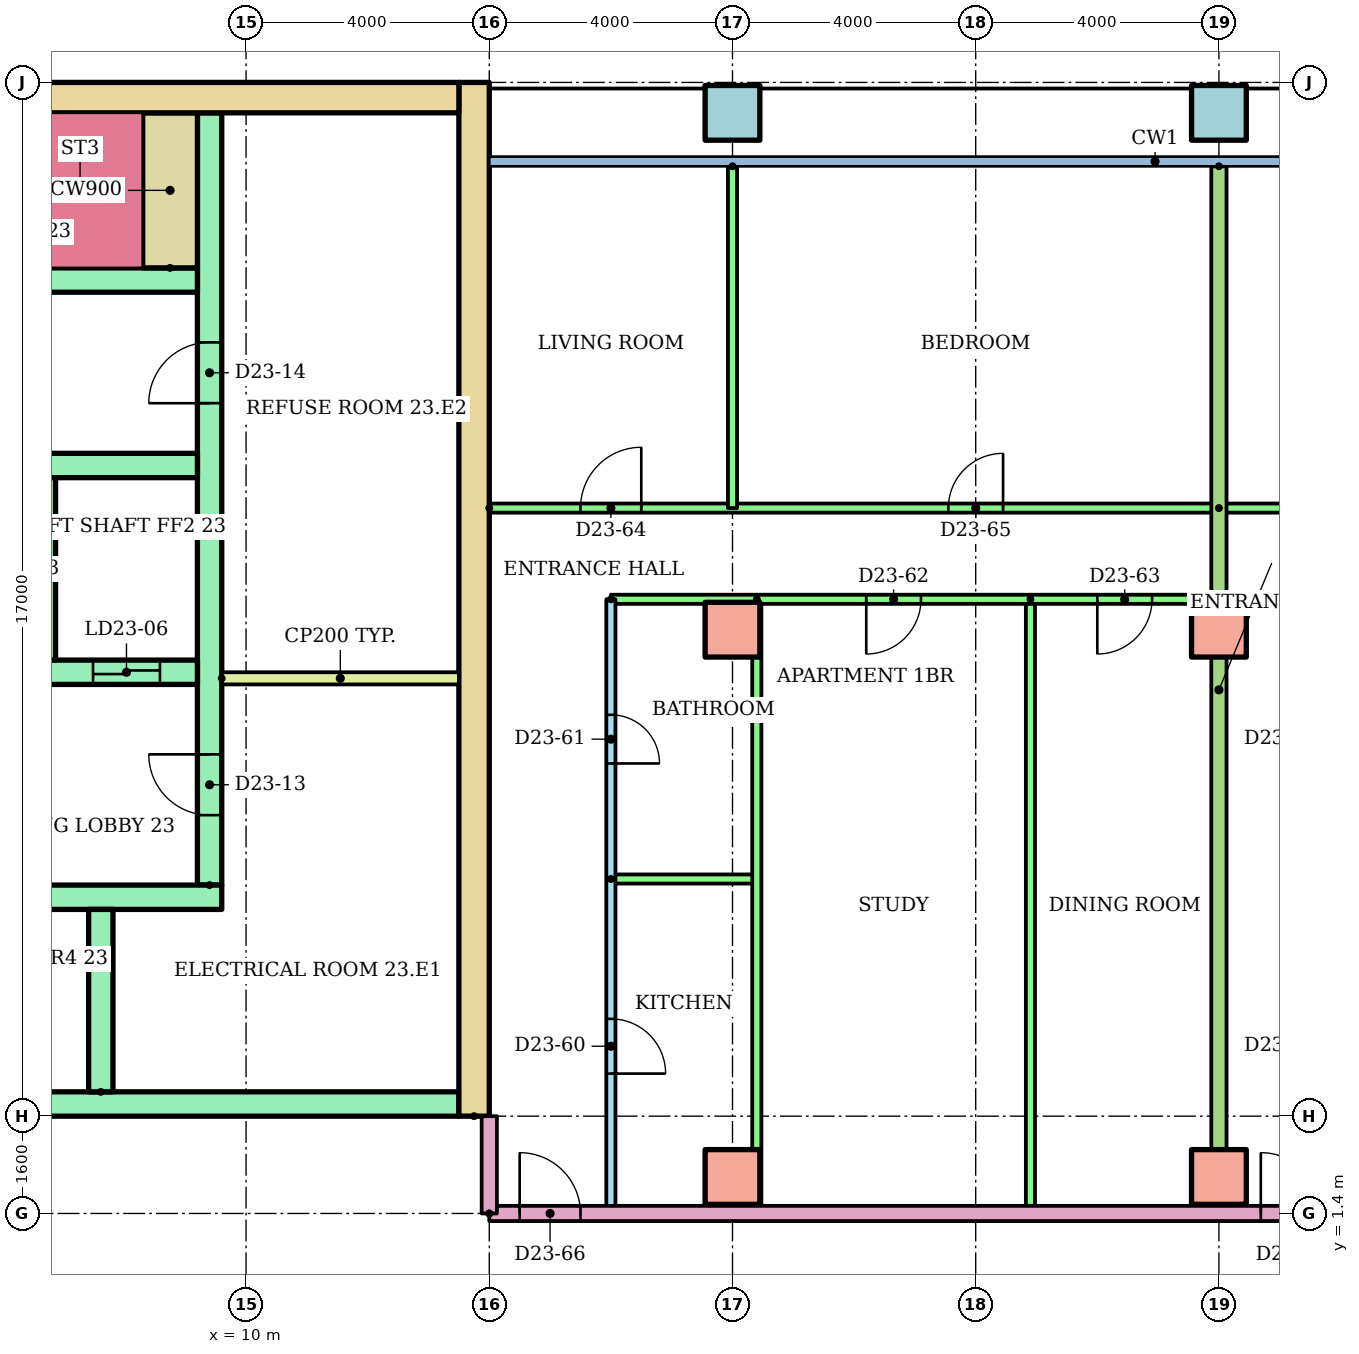
"""IFC4 building model, lengths in metres.
Left out: names, types, materials, properties, quantities, classifications, styles, units other than length and angle.
Written with IfcOpenShell. Run it as: python <this file> out.ifc"""

import sys

from ifc_helpers import new_model, si_unit, direction, frame, frame_2d, origin, origin_2d, place, context, subcontext, project, spatial, rectangle, hollow_rectangle, extrude, element, fill, save


model = new_model("IFC4")
c1 = context("Model", 3, precision=1e-05, world=origin(), true_north=direction((0.0, 1.0)))
c2 = subcontext(c1, "Body", "Model", "MODEL_VIEW")
j1 = project(units=[si_unit("LENGTHUNIT", "METRE"), si_unit("PLANEANGLEUNIT", "RADIAN")], contexts=[c1])
p1 = place(None, origin())
s1 = spatial("IfcSite", under=j1, at=p1, CompositionType="ELEMENT")
p2 = place(p1, origin())
s2 = spatial("IfcBuilding", under=s1, at=p2, CompositionType="ELEMENT")
p3 = place(p2, frame((0.0, 0.0, 90.3)))
s3 = spatial("IfcBuildingStorey", under=s2, at=p3, CompositionType="ELEMENT", Elevation=90.3)
for number, where in (
    (1, (18.0, 2.0, 0.0)),
    (2, (26.0, 2.0, 0.0)),
    (3, (18.0, 11.0, 0.0)),
    (4, (26.0, 11.0, 0.0)),
):
    element("IfcColumn", number, at=place(p3, frame(where)), inside=s3, PredefinedType="COLUMN", context=c2, shape_type="SweptSolid", body=[
        extrude(rectangle(XDim=0.9, YDim=0.9, at=origin_2d()), origin(), (0.0, 0.0, 1.0), 3.2),
    ])
for number, where in (
    (5, (18.0, 19.5, 0.0)),
    (6, (26.0, 19.5, 0.0)),
):
    element("IfcColumn", number, at=place(p3, frame(where)), inside=s3, PredefinedType="COLUMN", context=c2, shape_type="SweptSolid", body=[
        extrude(hollow_rectangle(XDim=0.9, YDim=0.9, WallThickness=0.045, at=origin_2d()), origin(), (0.0, 0.0, 1.0), 3.2),
    ])
p4 = place(p3, frame((13.75, 3.0, 0.0), z_axis=(0.0, 0.0, 1.0), x_axis=(0.0, 1.0, 0.0)))
e7 = element("IfcWall", 7, at=p4, inside=s3, PredefinedType="SHEAR", context=c2, shape_type="SweptSolid", body=[
    extrude(rectangle(XDim=17.0, YDim=0.5, at=frame_2d((8.5, 0.0))), origin(), (0.0, 0.0, 1.0), 2.92),
])
p5 = place(p3, frame((-13.5, 19.75, 0.0)))
e8 = element("IfcWall", 8, at=p5, inside=s3, PredefinedType="SHEAR", context=c2, shape_type="SweptSolid", body=[
    extrude(rectangle(XDim=27.0, YDim=0.5, at=frame_2d((13.5, 0.0))), origin(), (0.0, 0.0, 1.0), 2.92),
])
p6 = place(p3, frame((9.4, 6.8, 0.0), z_axis=(0.0, 0.0, 1.0), x_axis=(0.0, 1.0, 0.0)))
e9 = element("IfcWall", 9, at=p6, inside=s3, PredefinedType="SHEAR", context=c2, shape_type="SweptSolid", body=[
    extrude(rectangle(XDim=12.7, YDim=0.4, at=frame_2d((6.35, 0.0))), origin(), (0.0, 0.0, 1.0), 2.92),
])
p7 = place(p6, frame((1.15, 0.0, 0.0)))
e10 = element("IfcOpeningElement", 10, at=p7, cuts=e9, PredefinedType="OPENING", context=c2, shape_type="SweptSolid", body=[
    extrude(rectangle(XDim=1.0, YDim=2.1, at=frame_2d((0.5, 1.05))), frame((0.0, 0.21, 0.0), z_axis=(0.0, -1.0, 0.0), x_axis=(1.0, 0.0, 0.0)), (0.0, 0.0, 1.0), 0.42),
])
p8 = place(p6, frame((7.925, 0.0, 0.0)))
e11 = element("IfcOpeningElement", 11, at=p8, cuts=e9, PredefinedType="OPENING", context=c2, shape_type="SweptSolid", body=[
    extrude(rectangle(XDim=1.0, YDim=2.1, at=frame_2d((0.5, 1.05))), frame((0.0, 0.21, 0.0), z_axis=(0.0, -1.0, 0.0), x_axis=(1.0, 0.0, 0.0)), (0.0, 0.0, 1.0), 0.42),
])
p9 = place(p3, frame((-13.5, 3.2, 0.0)))
e12 = element("IfcWall", 12, at=p9, inside=s3, PredefinedType="SHEAR", context=c2, shape_type="SweptSolid", body=[
    extrude(rectangle(XDim=27.0, YDim=0.4, at=frame_2d((13.5, 0.0))), origin(), (0.0, 0.0, 1.0), 2.92),
])
p10 = place(p9, frame((6.861, 0.0, 0.0)))
e13 = element("IfcOpeningElement", 13, at=p10, cuts=e12, PredefinedType="OPENING", context=c2, shape_type="SweptSolid", body=[
    extrude(rectangle(XDim=1.1, YDim=2.1, at=frame_2d((0.55, 1.05))), frame((0.0, 0.21, 0.0), z_axis=(0.0, -1.0, 0.0), x_axis=(1.0, 0.0, 0.0)), (0.0, 0.0, 1.0), 0.42),
])
p11 = place(p9, frame((9.906, 0.0, 0.0)))
e14 = element("IfcOpeningElement", 14, at=p11, cuts=e12, PredefinedType="OPENING", context=c2, shape_type="SweptSolid", body=[
    extrude(rectangle(XDim=1.1, YDim=2.1, at=frame_2d((0.55, 1.05))), frame((0.0, 0.21, 0.0), z_axis=(0.0, -1.0, 0.0), x_axis=(1.0, 0.0, 0.0)), (0.0, 0.0, 1.0), 0.42),
])
p12 = place(p9, frame((15.994, 0.0, 0.0)))
e15 = element("IfcOpeningElement", 15, at=p12, cuts=e12, PredefinedType="OPENING", context=c2, shape_type="SweptSolid", body=[
    extrude(rectangle(XDim=1.1, YDim=2.1, at=frame_2d((0.55, 1.05))), frame((0.0, 0.21, 0.0), z_axis=(0.0, -1.0, 0.0), x_axis=(1.0, 0.0, 0.0)), (0.0, 0.0, 1.0), 0.42),
])
p13 = place(p9, frame((19.039, 0.0, 0.0)))
e16 = element("IfcOpeningElement", 16, at=p13, cuts=e12, PredefinedType="OPENING", context=c2, shape_type="SweptSolid", body=[
    extrude(rectangle(XDim=1.1, YDim=2.1, at=frame_2d((0.55, 1.05))), frame((0.0, 0.21, 0.0), z_axis=(0.0, -1.0, 0.0), x_axis=(1.0, 0.0, 0.0)), (0.0, 0.0, 1.0), 0.42),
])
p14 = place(p9, frame((12.6, 0.0, 0.0)))
e17 = element("IfcOpeningElement", 17, at=p14, cuts=e12, PredefinedType="OPENING", context=c2, shape_type="SweptSolid", body=[
    extrude(rectangle(XDim=1.8, YDim=2.1, at=frame_2d((0.9, 1.05))), frame((0.0, 0.21, 0.0), z_axis=(0.0, -1.0, 0.0), x_axis=(1.0, 0.0, 0.0)), (0.0, 0.0, 1.0), 0.42),
])
p15 = place(p3, frame((1.522, 6.6, 0.0)))
e18 = element("IfcWall", 18, at=p15, inside=s3, PredefinedType="SHEAR", context=c2, shape_type="SweptSolid", body=[
    extrude(rectangle(XDim=8.078, YDim=0.4, at=frame_2d((4.039, 0.0))), origin(), (0.0, 0.0, 1.0), 2.92),
])
p16 = place(p3, frame((7.611, 3.4, 0.0), z_axis=(0.0, 0.0, 1.0), x_axis=(0.0, 1.0, 0.0)))
e19 = element("IfcWall", 19, at=p16, inside=s3, PredefinedType="SHEAR", context=c2, shape_type="SweptSolid", body=[
    extrude(rectangle(XDim=3.0, YDim=0.4, at=frame_2d((1.5, 0.0))), origin(), (0.0, 0.0, 1.0), 2.92),
])
p17 = place(p3, frame((1.2, 10.3, 0.0)))
e20 = element("IfcWall", 20, at=p17, inside=s3, PredefinedType="SHEAR", context=c2, shape_type="SweptSolid", body=[
    extrude(rectangle(XDim=8.0, YDim=0.4, at=frame_2d((4.0, 0.0))), origin(), (0.0, 0.0, 1.0), 2.92),
])
p18 = place(p17, frame((3.55, 0.0, 0.0)))
e21 = element("IfcOpeningElement", 21, at=p18, cuts=e20, PredefinedType="OPENING", context=c2, shape_type="SweptSolid", body=[
    extrude(rectangle(XDim=1.1, YDim=2.1, at=frame_2d((0.55, 1.05))), frame((0.0, 0.21, 0.0), z_axis=(0.0, -1.0, 0.0), x_axis=(1.0, 0.0, 0.0)), (0.0, 0.0, 1.0), 0.42),
])
p19 = place(p17, frame((6.283, 0.0, 0.0)))
e22 = element("IfcOpeningElement", 22, at=p19, cuts=e20, PredefinedType="OPENING", context=c2, shape_type="SweptSolid", body=[
    extrude(rectangle(XDim=1.1, YDim=2.1, at=frame_2d((0.55, 1.05))), frame((0.0, 0.21, 0.0), z_axis=(0.0, -1.0, 0.0), x_axis=(1.0, 0.0, 0.0)), (0.0, 0.0, 1.0), 0.42),
])
p20 = place(p17, frame((0.867, 0.0, 0.0)))
e23 = element("IfcOpeningElement", 23, at=p20, cuts=e20, PredefinedType="OPENING", context=c2, shape_type="SweptSolid", body=[
    extrude(rectangle(XDim=1.0, YDim=2.1, at=frame_2d((0.5, 1.05))), frame((0.0, 0.21, 0.0), z_axis=(0.0, -1.0, 0.0), x_axis=(1.0, 0.0, 0.0)), (0.0, 0.0, 1.0), 0.42),
])
p21 = place(p3, frame((1.2, 13.7, 0.0)))
e24 = element("IfcWall", 24, at=p21, inside=s3, PredefinedType="SHEAR", context=c2, shape_type="SweptSolid", body=[
    extrude(rectangle(XDim=8.0, YDim=0.4, at=frame_2d((4.0, 0.0))), origin(), (0.0, 0.0, 1.0), 2.92),
])
p22 = place(p3, frame((6.667, 10.5, 0.0), z_axis=(0.0, 0.0, 1.0), x_axis=(0.0, 1.0, 0.0)))
e25 = element("IfcWall", 25, at=p22, inside=s3, PredefinedType="SHEAR", context=c2, shape_type="SweptSolid", body=[
    extrude(rectangle(XDim=3.0, YDim=0.4, at=frame_2d((1.5, 0.0))), origin(), (0.0, 0.0, 1.0), 2.92),
])
p23 = place(p3, frame((-9.2, 16.75, 0.0)))
e26 = element("IfcWall", 26, at=p23, inside=s3, PredefinedType="SHEAR", context=c2, shape_type="SweptSolid", body=[
    extrude(rectangle(XDim=18.4, YDim=0.4, at=frame_2d((9.2, 0.0))), origin(), (0.0, 0.0, 1.0), 2.92),
])
p24 = place(p23, frame((0.1, 0.0, 0.0)))
e27 = element("IfcOpeningElement", 27, at=p24, cuts=e26, PredefinedType="OPENING", context=c2, shape_type="SweptSolid", body=[
    extrude(rectangle(XDim=0.95, YDim=2.1, at=frame_2d((0.475, 1.05))), frame((0.0, 0.21, 0.0), z_axis=(0.0, -1.0, 0.0), x_axis=(1.0, 0.0, 0.0)), (0.0, 0.0, 1.0), 0.42),
])
p25 = place(p23, frame((6.1, 0.0, 0.0)))
e28 = element("IfcOpeningElement", 28, at=p25, cuts=e26, PredefinedType="OPENING", context=c2, shape_type="SweptSolid", body=[
    extrude(rectangle(XDim=0.95, YDim=2.1, at=frame_2d((0.475, 1.05))), frame((0.0, 0.21, 0.0), z_axis=(0.0, -1.0, 0.0), x_axis=(1.0, 0.0, 0.0)), (0.0, 0.0, 1.0), 0.42),
])
p26 = place(p23, frame((12.1, 0.0, 0.0)))
e29 = element("IfcOpeningElement", 29, at=p26, cuts=e26, PredefinedType="OPENING", context=c2, shape_type="SweptSolid", body=[
    extrude(rectangle(XDim=0.95, YDim=2.1, at=frame_2d((0.475, 1.05))), frame((0.0, 0.21, 0.0), z_axis=(0.0, -1.0, 0.0), x_axis=(1.0, 0.0, 0.0)), (0.0, 0.0, 1.0), 0.42),
])
p27 = place(p3, frame((8.75, 16.95, 0.0), z_axis=(0.0, 0.0, 1.0), x_axis=(0.0, 1.0, 0.0)))
e30 = element("IfcWall", 30, at=p27, inside=s3, PredefinedType="SHEAR", context=c2, shape_type="SweptSolid", body=[
    extrude(rectangle(XDim=2.55, YDim=0.9, at=frame_2d((1.275, 0.0))), origin(), (0.0, 0.0, 1.0), 2.92),
])
p28 = place(p3, frame((9.6, 10.2, 0.0)))
e31 = element("IfcWall", 31, at=p28, inside=s3, PredefinedType="PARTITIONING", context=c2, shape_type="SweptSolid", body=[
    extrude(rectangle(XDim=3.9, YDim=0.2, at=frame_2d((1.95, 0.0))), origin(), (0.0, 0.0, 1.0), 2.92),
])
p29 = place(p3, frame((16.0, 11.5, 0.0), z_axis=(0.0, 0.0, 1.0), x_axis=(0.0, -1.0, 0.0)))
e32 = element("IfcWall", 32, at=p29, inside=s3, PredefinedType="PARTITIONING", context=c2, shape_type="SweptSolid", body=[
    extrude(rectangle(XDim=10.1, YDim=0.15, at=frame_2d((5.05, 0.0))), origin(), (0.0, 0.0, 1.0), 2.4),
])
p30 = place(p29, frame((6.9, 0.0, 0.0)))
e33 = element("IfcOpeningElement", 33, at=p30, cuts=e32, PredefinedType="OPENING", context=c2, shape_type="SweptSolid", body=[
    extrude(rectangle(XDim=0.9, YDim=2.1, at=frame_2d((0.45, 1.05))), frame((0.0, 0.085, 0.0), z_axis=(0.0, -1.0, 0.0), x_axis=(1.0, 0.0, 0.0)), (0.0, 0.0, 1.0), 0.17),
])
p31 = place(p29, frame((1.9, 0.0, 0.0)))
e34 = element("IfcOpeningElement", 34, at=p31, cuts=e32, PredefinedType="OPENING", context=c2, shape_type="SweptSolid", body=[
    extrude(rectangle(XDim=0.8, YDim=2.1, at=frame_2d((0.4, 1.05))), frame((0.0, 0.085, 0.0), z_axis=(0.0, -1.0, 0.0), x_axis=(1.0, 0.0, 0.0)), (0.0, 0.0, 1.0), 0.17),
])
p32 = place(p3, frame((16.0, 6.9, 0.0)))
e35 = element("IfcWall", 35, at=p32, inside=s3, PredefinedType="PARTITIONING", context=c2, shape_type="SweptSolid", body=[
    extrude(rectangle(XDim=2.4, YDim=0.15, at=frame_2d((1.2, 0.0))), origin(), (0.0, 0.0, 1.0), 2.4),
])
for number, where, z_axis, x_axis in (
    (36, (18.4, 11.5, 0.0), (0.0, 0.0, 1.0), (0.0, -1.0, 0.0)),
    (37, (22.9, 11.5, 0.0), (0.0, 0.0, 1.0), (0.0, -1.0, 0.0)),
):
    element("IfcWall", number, at=place(p3, frame(where, z_axis=z_axis, x_axis=x_axis)), inside=s3, PredefinedType="PARTITIONING", context=c2, shape_type="SweptSolid", body=[
        extrude(rectangle(XDim=10.1, YDim=0.15, at=frame_2d((5.05, 0.0))), origin(), (0.0, 0.0, 1.0), 2.4),
    ])
p33 = place(p3, frame((26.0, 11.5, 0.0), z_axis=(0.0, 0.0, 1.0), x_axis=(-1.0, 0.0, 0.0)))
e38 = element("IfcWall", 38, at=p33, inside=s3, PredefinedType="PARTITIONING", context=c2, shape_type="SweptSolid", body=[
    extrude(rectangle(XDim=10.0, YDim=0.15, at=frame_2d((5.0, 0.0))), origin(), (0.0, 0.0, 1.0), 2.4),
])
p34 = place(p33, frame((4.9, 0.0, 0.0)))
e39 = element("IfcOpeningElement", 39, at=p34, cuts=e38, PredefinedType="OPENING", context=c2, shape_type="SweptSolid", body=[
    extrude(rectangle(XDim=0.9, YDim=2.1, at=frame_2d((0.45, 1.05))), frame((0.0, 0.085, 0.0), z_axis=(0.0, -1.0, 0.0), x_axis=(1.0, 0.0, 0.0)), (0.0, 0.0, 1.0), 0.17),
])
p35 = place(p33, frame((1.1, 0.0, 0.0)))
e40 = element("IfcOpeningElement", 40, at=p35, cuts=e38, PredefinedType="OPENING", context=c2, shape_type="SweptSolid", body=[
    extrude(rectangle(XDim=0.9, YDim=2.1, at=frame_2d((0.45, 1.05))), frame((0.0, 0.085, 0.0), z_axis=(0.0, -1.0, 0.0), x_axis=(1.0, 0.0, 0.0)), (0.0, 0.0, 1.0), 0.17),
])
p36 = place(p3, frame((14.0, 13.0, 0.0)))
e41 = element("IfcWall", 41, at=p36, inside=s3, PredefinedType="PARTITIONING", context=c2, shape_type="SweptSolid", body=[
    extrude(rectangle(XDim=12.0, YDim=0.15, at=frame_2d((6.0, 0.0))), origin(), (0.0, 0.0, 1.0), 2.4),
])
p37 = place(p36, frame((1.5, 0.0, 0.0)))
e42 = element("IfcOpeningElement", 42, at=p37, cuts=e41, PredefinedType="OPENING", context=c2, shape_type="SweptSolid", body=[
    extrude(rectangle(XDim=1.0, YDim=2.1, at=frame_2d((0.5, 1.05))), frame((0.0, 0.085, 0.0), z_axis=(0.0, -1.0, 0.0), x_axis=(1.0, 0.0, 0.0)), (0.0, 0.0, 1.0), 0.17),
])
p38 = place(p36, frame((7.55, 0.0, 0.0)))
e43 = element("IfcOpeningElement", 43, at=p38, cuts=e41, PredefinedType="OPENING", context=c2, shape_type="SweptSolid", body=[
    extrude(rectangle(XDim=0.9, YDim=2.1, at=frame_2d((0.45, 1.05))), frame((0.0, 0.085, 0.0), z_axis=(0.0, -1.0, 0.0), x_axis=(1.0, 0.0, 0.0)), (0.0, 0.0, 1.0), 0.17),
])
p39 = place(p3, frame((18.0, 18.621, 0.0), z_axis=(0.0, 0.0, 1.0), x_axis=(0.0, -1.0, 0.0)))
e44 = element("IfcWall", 44, at=p39, inside=s3, PredefinedType="PARTITIONING", context=c2, shape_type="SweptSolid", body=[
    extrude(rectangle(XDim=5.621, YDim=0.15, at=frame_2d((2.811, 0.0))), origin(), (0.0, 0.0, 1.0), 2.4),
])
p40 = place(p3, frame((26.0, 13.0, 0.0)))
e45 = element("IfcWall", 45, at=p40, inside=s3, PredefinedType="PARTITIONING", context=c2, shape_type="SweptSolid", body=[
    extrude(rectangle(XDim=14.62, YDim=0.15, at=frame_2d((7.31, 0.0))), origin(), (0.0, 0.0, 1.0), 2.4),
])
p41 = place(p40, frame((3.5, 0.0, 0.0)))
e46 = element("IfcOpeningElement", 46, at=p41, cuts=e45, PredefinedType="OPENING", context=c2, shape_type="SweptSolid", body=[
    extrude(rectangle(XDim=1.0, YDim=2.1, at=frame_2d((0.5, 1.05))), frame((0.0, 0.085, 0.0), z_axis=(0.0, -1.0, 0.0), x_axis=(1.0, 0.0, 0.0)), (0.0, 0.0, 1.0), 0.17),
])
p42 = place(p40, frame((10.75, 0.0, 0.0)))
e47 = element("IfcOpeningElement", 47, at=p42, cuts=e45, PredefinedType="OPENING", context=c2, shape_type="SweptSolid", body=[
    extrude(rectangle(XDim=0.9, YDim=2.1, at=frame_2d((0.45, 1.05))), frame((0.0, 0.085, 0.0), z_axis=(0.0, -1.0, 0.0), x_axis=(1.0, 0.0, 0.0)), (0.0, 0.0, 1.0), 0.17),
])
p43 = place(p3, frame((26.0, 18.621, 0.0), z_axis=(0.0, 0.0, 1.0), x_axis=(0.0, -1.0, 0.0)))
e48 = element("IfcWall", 48, at=p43, inside=s3, PredefinedType="PARTITIONING", context=c2, shape_type="SweptSolid", body=[
    extrude(rectangle(XDim=17.221, YDim=0.25, at=frame_2d((8.611, 0.0))), origin(), (0.0, 0.0, 1.0), 2.4),
])
p44 = place(p3, frame((14.0, 1.4, 0.0)))
e49 = element("IfcWall", 49, at=p44, inside=s3, PredefinedType="PARTITIONING", context=c2, shape_type="SweptSolid", body=[
    extrude(rectangle(XDim=15.0, YDim=0.25, at=frame_2d((7.5, 0.0))), origin(), (0.0, 0.0, 1.0), 2.4),
])
p45 = place(p44, frame((0.5, 0.0, 0.0)))
e50 = element("IfcOpeningElement", 50, at=p45, cuts=e49, PredefinedType="OPENING", context=c2, shape_type="SweptSolid", body=[
    extrude(rectangle(XDim=1.0, YDim=2.1, at=frame_2d((0.5, 1.05))), frame((0.0, 0.135, 0.0), z_axis=(0.0, -1.0, 0.0), x_axis=(1.0, 0.0, 0.0)), (0.0, 0.0, 1.0), 0.27),
])
p46 = place(p44, frame((12.689, 0.0, 0.0)))
e51 = element("IfcOpeningElement", 51, at=p46, cuts=e49, PredefinedType="OPENING", context=c2, shape_type="SweptSolid", body=[
    extrude(rectangle(XDim=1.0, YDim=2.1, at=frame_2d((0.5, 1.05))), frame((0.0, 0.135, 0.0), z_axis=(0.0, -1.0, 0.0), x_axis=(1.0, 0.0, 0.0)), (0.0, 0.0, 1.0), 0.27),
])
p47 = place(p3, frame((14.0, 1.4, 0.0), z_axis=(0.0, 0.0, 1.0), x_axis=(0.0, 1.0, 0.0)))
e52 = element("IfcWall", 52, at=p47, inside=s3, PredefinedType="PARTITIONING", context=c2, shape_type="SweptSolid", body=[
    extrude(rectangle(XDim=1.6, YDim=0.25, at=frame_2d((0.8, 0.0))), origin(), (0.0, 0.0, 1.0), 2.4),
])
p48 = place(p19, origin())
e53 = element("IfcDoor", 53, at=p48, inside=s3, OperationType="SLIDING_TO_LEFT", PredefinedType="DOOR", context=c2, shape_type="SweptSolid", body=[
    extrude(rectangle(XDim=1.1, YDim=2.1, at=frame_2d((0.55, 1.05))), frame((0.0, 0.025, 0.0), z_axis=(0.0, -1.0, 0.0), x_axis=(1.0, 0.0, 0.0)), (0.0, 0.0, 1.0), 0.05),
])
fill(e22, e53)
p49 = place(p7, origin())
e54 = element("IfcDoor", 54, at=p49, inside=s3, OperationType="SINGLE_SWING_RIGHT", PredefinedType="DOOR", context=c2, shape_type="SweptSolid", body=[
    extrude(rectangle(XDim=1.0, YDim=2.1, at=frame_2d((0.5, 1.05))), frame((0.0, 0.025, 0.0), z_axis=(0.0, -1.0, 0.0), x_axis=(1.0, 0.0, 0.0)), (0.0, 0.0, 1.0), 0.05),
])
fill(e10, e54)
p50 = place(p8, origin())
e55 = element("IfcDoor", 55, at=p50, inside=s3, OperationType="SINGLE_SWING_LEFT", PredefinedType="DOOR", context=c2, shape_type="SweptSolid", body=[
    extrude(rectangle(XDim=1.0, YDim=2.1, at=frame_2d((0.5, 1.05))), frame((0.0, 0.025, 0.0), z_axis=(0.0, -1.0, 0.0), x_axis=(1.0, 0.0, 0.0)), (0.0, 0.0, 1.0), 0.05),
])
fill(e11, e55)
p51 = place(p30, origin())
e56 = element("IfcDoor", 56, at=p51, inside=s3, OperationType="SINGLE_SWING_RIGHT", PredefinedType="DOOR", context=c2, shape_type="SweptSolid", body=[
    extrude(rectangle(XDim=0.9, YDim=2.1, at=frame_2d((0.45, 1.05))), frame((0.0, 0.025, 0.0), z_axis=(0.0, -1.0, 0.0), x_axis=(1.0, 0.0, 0.0)), (0.0, 0.0, 1.0), 0.05),
])
fill(e33, e56)
p52 = place(p31, origin())
e57 = element("IfcDoor", 57, at=p52, inside=s3, OperationType="SINGLE_SWING_RIGHT", PredefinedType="DOOR", context=c2, shape_type="SweptSolid", body=[
    extrude(rectangle(XDim=0.8, YDim=2.1, at=frame_2d((0.4, 1.05))), frame((0.0, 0.025, 0.0), z_axis=(0.0, -1.0, 0.0), x_axis=(1.0, 0.0, 0.0)), (0.0, 0.0, 1.0), 0.05),
])
fill(e34, e57)
p53 = place(p34, origin())
e58 = element("IfcDoor", 58, at=p53, inside=s3, OperationType="SINGLE_SWING_RIGHT", PredefinedType="DOOR", context=c2, shape_type="SweptSolid", body=[
    extrude(rectangle(XDim=0.9, YDim=2.1, at=frame_2d((0.45, 1.05))), frame((0.0, 0.025, 0.0), z_axis=(0.0, -1.0, 0.0), x_axis=(1.0, 0.0, 0.0)), (0.0, 0.0, 1.0), 0.05),
])
fill(e39, e58)
p54 = place(p35, origin())
e59 = element("IfcDoor", 59, at=p54, inside=s3, OperationType="SINGLE_SWING_RIGHT", PredefinedType="DOOR", context=c2, shape_type="SweptSolid", body=[
    extrude(rectangle(XDim=0.9, YDim=2.1, at=frame_2d((0.45, 1.05))), frame((0.0, 0.025, 0.0), z_axis=(0.0, -1.0, 0.0), x_axis=(1.0, 0.0, 0.0)), (0.0, 0.0, 1.0), 0.05),
])
fill(e40, e59)
p55 = place(p37, origin())
e60 = element("IfcDoor", 60, at=p55, inside=s3, OperationType="SINGLE_SWING_RIGHT", PredefinedType="DOOR", context=c2, shape_type="SweptSolid", body=[
    extrude(rectangle(XDim=1.0, YDim=2.1, at=frame_2d((0.5, 1.05))), frame((0.0, 0.025, 0.0), z_axis=(0.0, -1.0, 0.0), x_axis=(1.0, 0.0, 0.0)), (0.0, 0.0, 1.0), 0.05),
])
fill(e42, e60)
p56 = place(p38, origin())
e61 = element("IfcDoor", 61, at=p56, inside=s3, OperationType="SINGLE_SWING_RIGHT", PredefinedType="DOOR", context=c2, shape_type="SweptSolid", body=[
    extrude(rectangle(XDim=0.9, YDim=2.1, at=frame_2d((0.45, 1.05))), frame((0.0, 0.025, 0.0), z_axis=(0.0, -1.0, 0.0), x_axis=(1.0, 0.0, 0.0)), (0.0, 0.0, 1.0), 0.05),
])
fill(e43, e61)
p57 = place(p45, origin())
e62 = element("IfcDoor", 62, at=p57, inside=s3, OperationType="SINGLE_SWING_LEFT", PredefinedType="DOOR", context=c2, shape_type="SweptSolid", body=[
    extrude(rectangle(XDim=1.0, YDim=2.1, at=frame_2d((0.5, 1.05))), frame((0.0, 0.025, 0.0), z_axis=(0.0, -1.0, 0.0), x_axis=(1.0, 0.0, 0.0)), (0.0, 0.0, 1.0), 0.05),
])
fill(e50, e62)
p58 = place(p46, origin())
e63 = element("IfcDoor", 63, at=p58, inside=s3, OperationType="SINGLE_SWING_LEFT", PredefinedType="DOOR", context=c2, shape_type="SweptSolid", body=[
    extrude(rectangle(XDim=1.0, YDim=2.1, at=frame_2d((0.5, 1.05))), frame((0.0, 0.025, 0.0), z_axis=(0.0, -1.0, 0.0), x_axis=(1.0, 0.0, 0.0)), (0.0, 0.0, 1.0), 0.05),
])
fill(e51, e63)
save(model, sys.argv[1])
